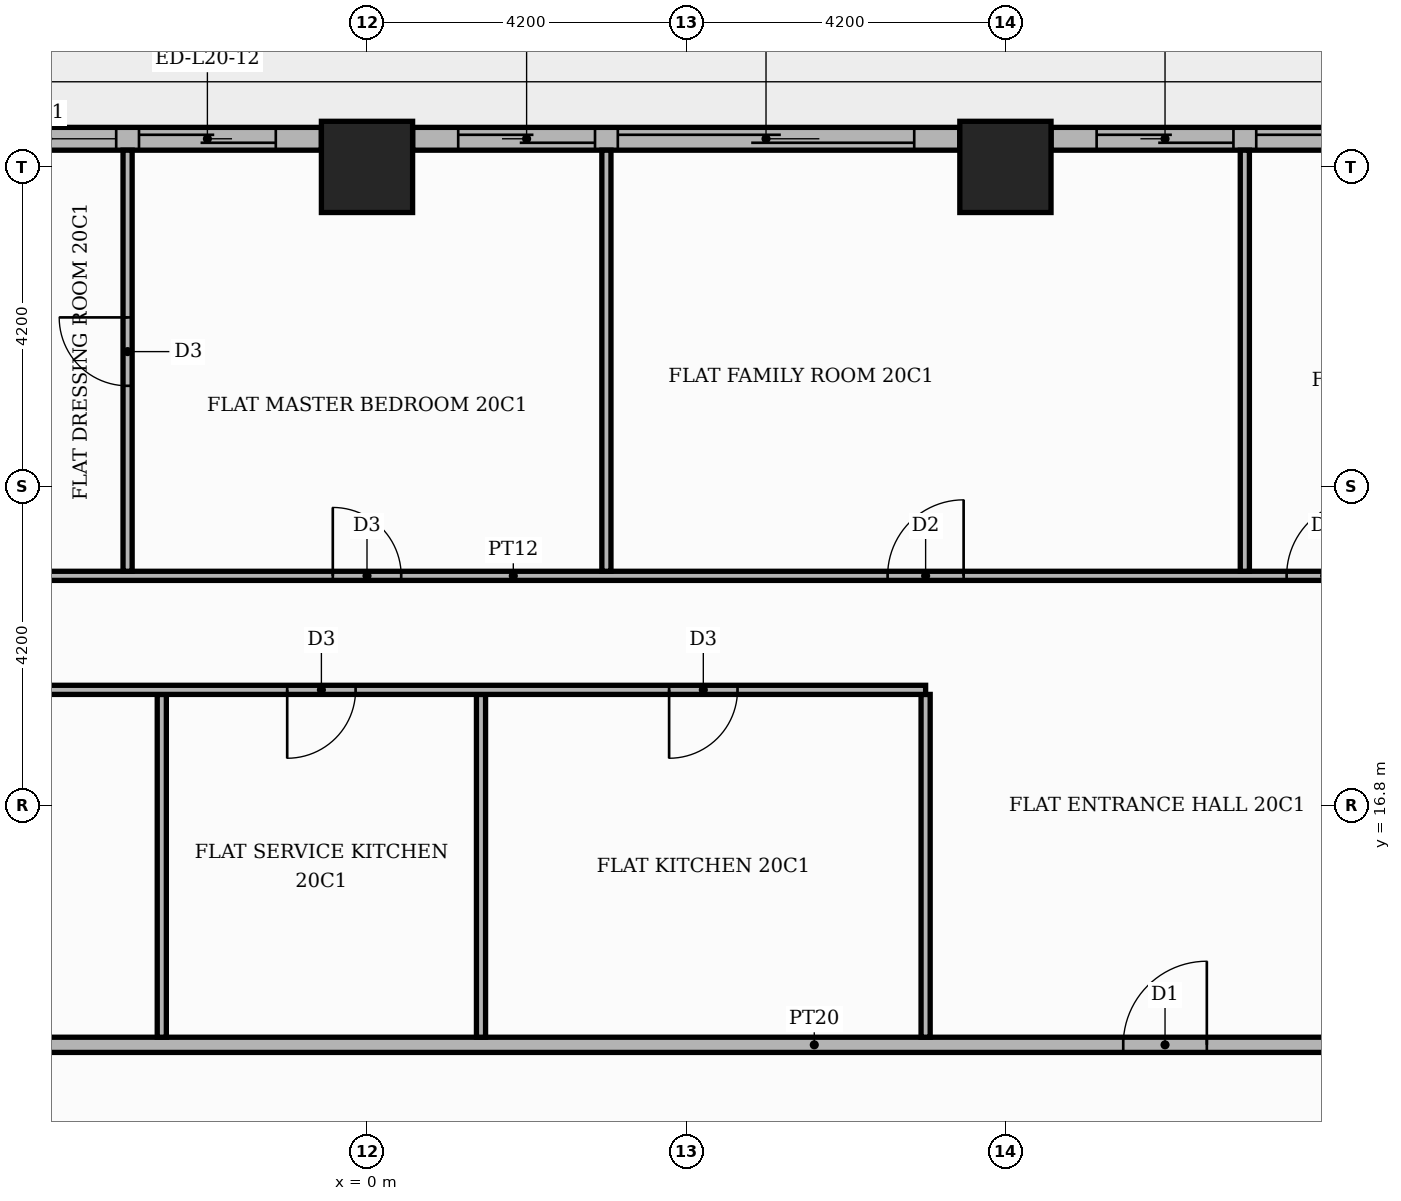
"""IFC4 building model, lengths in metres.
Left out: names, types, materials, properties, quantities, classifications, styles, units other than length and angle.
Written with IfcOpenShell. Run it as: python <this file> out.ifc"""

import sys

from ifc_helpers import new_model, si_unit, direction, frame, frame_2d, origin, origin_2d, place, context, subcontext, project, spatial, rectangle, extrude, element, fill, save


model = new_model("IFC4")
c1 = context("Model", 3, precision=1e-05, world=origin(), true_north=direction((0.0, 1.0)))
c2 = subcontext(c1, "Body", "Model", "MODEL_VIEW")
j1 = project(units=[si_unit("LENGTHUNIT", "METRE"), si_unit("PLANEANGLEUNIT", "RADIAN")], contexts=[c1])
p1 = place(None, origin())
s1 = spatial("IfcSite", under=j1, at=p1, CompositionType="ELEMENT")
p2 = place(p1, origin())
s2 = spatial("IfcBuilding", under=s1, at=p2, CompositionType="ELEMENT")
p3 = place(p2, frame((0.0, 0.0, 87.0)))
s3 = spatial("IfcBuildingStorey", under=s2, at=p3, CompositionType="ELEMENT", Elevation=87.0)
for number, where, z_axis, x_axis in (
    (1, (0.0, 25.2, 0.0), (0.0, 0.0, 1.0), (1.0, 0.0, 0.0)),
    (2, (8.4, 25.2, 0.0), (0.0, 0.0, 1.0), (1.0, 0.0, 0.0)),
):
    element("IfcColumn", number, at=place(p3, frame(where, z_axis=z_axis, x_axis=x_axis)), inside=s3, PredefinedType="COLUMN", context=c2, shape_type="SweptSolid", body=[
        extrude(rectangle(XDim=1.2, YDim=1.2, at=origin_2d()), origin(), (0.0, 0.0, 1.0), 3.9),
    ])
p4 = place(p3, frame((16.2, 25.57, 0.0), z_axis=(0.0, 0.0, 1.0), x_axis=(-1.0, 0.0, 0.0)))
e3 = element("IfcWall", 3, at=p4, inside=s3, PredefinedType="STANDARD", context=c2, shape_type="SweptSolid", body=[
    extrude(rectangle(XDim=7.2, YDim=0.3, at=frame_2d((3.6, 0.0))), origin(), (0.0, 0.0, 1.0), 3.48),
])
p5 = place(p4, frame((0.6, 0.0, 0.0)))
e4 = element("IfcOpeningElement", 4, at=p5, cuts=e3, PredefinedType="OPENING", context=c2, shape_type="SweptSolid", body=[
    extrude(rectangle(XDim=3.9, YDim=2.4, at=frame_2d((1.95, 1.2))), frame((0.0, 0.16, 0.0), z_axis=(0.0, -1.0, 0.0), x_axis=(1.0, 0.0, 0.0)), (0.0, 0.0, 1.0), 0.32),
])
p6 = place(p4, frame((4.8, 0.0, 0.0)))
e5 = element("IfcOpeningElement", 5, at=p6, cuts=e3, PredefinedType="OPENING", context=c2, shape_type="SweptSolid", body=[
    extrude(rectangle(XDim=1.8, YDim=2.4, at=frame_2d((0.9, 1.2))), frame((0.0, 0.16, 0.0), z_axis=(0.0, -1.0, 0.0), x_axis=(1.0, 0.0, 0.0)), (0.0, 0.0, 1.0), 0.32),
])
p7 = place(p3, frame((7.8, 25.57, 0.0), z_axis=(0.0, 0.0, 1.0), x_axis=(-1.0, 0.0, 0.0)))
e6 = element("IfcWall", 6, at=p7, inside=s3, PredefinedType="STANDARD", context=c2, shape_type="SweptSolid", body=[
    extrude(rectangle(XDim=7.2, YDim=0.3, at=frame_2d((3.6, 0.0))), origin(), (0.0, 0.0, 1.0), 3.48),
])
p8 = place(p7, frame((0.6, 0.0, 0.0)))
e7 = element("IfcOpeningElement", 7, at=p8, cuts=e6, PredefinedType="OPENING", context=c2, shape_type="SweptSolid", body=[
    extrude(rectangle(XDim=3.9, YDim=2.4, at=frame_2d((1.95, 1.2))), frame((0.0, 0.16, 0.0), z_axis=(0.0, -1.0, 0.0), x_axis=(1.0, 0.0, 0.0)), (0.0, 0.0, 1.0), 0.32),
])
p9 = place(p7, frame((4.8, 0.0, 0.0)))
e8 = element("IfcOpeningElement", 8, at=p9, cuts=e6, PredefinedType="OPENING", context=c2, shape_type="SweptSolid", body=[
    extrude(rectangle(XDim=1.8, YDim=2.4, at=frame_2d((0.9, 1.2))), frame((0.0, 0.16, 0.0), z_axis=(0.0, -1.0, 0.0), x_axis=(1.0, 0.0, 0.0)), (0.0, 0.0, 1.0), 0.32),
])
p10 = place(p3, frame((-0.6, 25.57, 0.0), z_axis=(0.0, 0.0, 1.0), x_axis=(-1.0, 0.0, 0.0)))
e9 = element("IfcWall", 9, at=p10, inside=s3, PredefinedType="STANDARD", context=c2, shape_type="SweptSolid", body=[
    extrude(rectangle(XDim=7.2, YDim=0.3, at=frame_2d((3.6, 0.0))), origin(), (0.0, 0.0, 1.0), 3.48),
])
p11 = place(p10, frame((0.6, 0.0, 0.0)))
e10 = element("IfcOpeningElement", 10, at=p11, cuts=e9, PredefinedType="OPENING", context=c2, shape_type="SweptSolid", body=[
    extrude(rectangle(XDim=1.8, YDim=2.4, at=frame_2d((0.9, 1.2))), frame((0.0, 0.16, 0.0), z_axis=(0.0, -1.0, 0.0), x_axis=(1.0, 0.0, 0.0)), (0.0, 0.0, 1.0), 0.32),
])
p12 = place(p10, frame((2.7, 0.0, 0.9)))
e11 = element("IfcOpeningElement", 11, at=p12, cuts=e9, PredefinedType="OPENING", context=c2, shape_type="SweptSolid", body=[
    extrude(rectangle(XDim=1.8, YDim=2.1, at=frame_2d((0.9, 1.05))), frame((0.0, 0.16, 0.0), z_axis=(0.0, -1.0, 0.0), x_axis=(1.0, 0.0, 0.0)), (0.0, 0.0, 1.0), 0.32),
])
p13 = place(p10, frame((4.8, 0.0, 0.9)))
e12 = element("IfcOpeningElement", 12, at=p13, cuts=e9, PredefinedType="OPENING", context=c2, shape_type="SweptSolid", body=[
    extrude(rectangle(XDim=1.8, YDim=2.1, at=frame_2d((0.9, 1.05))), frame((0.0, 0.16, 0.0), z_axis=(0.0, -1.0, 0.0), x_axis=(1.0, 0.0, 0.0)), (0.0, 0.0, 1.0), 0.32),
])
p14 = place(p3, frame((-13.65, 13.65, 0.0), z_axis=(0.0, 0.0, 1.0), x_axis=(1.0, 0.0, 0.0)))
e13 = element("IfcWall", 13, at=p14, inside=s3, PredefinedType="PARTITIONING", context=c2, shape_type="SweptSolid", body=[
    extrude(rectangle(XDim=39.07, YDim=0.2, at=frame_2d((19.535, 0.0))), origin(), (0.0, 0.0, 1.0), 3.48),
])
p15 = place(p14, frame((23.6, 0.0, 0.0)))
e14 = element("IfcOpeningElement", 14, at=p15, cuts=e13, PredefinedType="OPENING", context=c2, shape_type="SweptSolid", body=[
    extrude(rectangle(XDim=1.1, YDim=2.4, at=frame_2d((0.55, 1.2))), frame((0.0, 0.11, 0.0), z_axis=(0.0, -1.0, 0.0), x_axis=(1.0, 0.0, 0.0)), (0.0, 0.0, 1.0), 0.22),
])
for number, where, z_axis, x_axis in (
    (15, (-2.7, 13.75, 0.0), (0.0, 0.0, 1.0), (0.0, 1.0, 0.0)),
    (16, (1.5, 13.75, 0.0), (0.0, 0.0, 1.0), (0.0, 1.0, 0.0)),
    (17, (7.35, 13.75, 0.0), (0.0, 0.0, 1.0), (0.0, 1.0, 0.0)),
):
    element("IfcWall", number, at=place(p3, frame(where, z_axis=z_axis, x_axis=x_axis)), inside=s3, PredefinedType="PARTITIONING", context=c2, shape_type="SweptSolid", body=[
        extrude(rectangle(XDim=4.51, YDim=0.12, at=frame_2d((2.255, 0.0))), origin(), (0.0, 0.0, 1.0), 3.48),
    ])
p16 = place(p3, frame((-13.55, 18.32, 0.0), z_axis=(0.0, 0.0, 1.0), x_axis=(1.0, 0.0, 0.0)))
e18 = element("IfcWall", 18, at=p16, inside=s3, PredefinedType="PARTITIONING", context=c2, shape_type="SweptSolid", body=[
    extrude(rectangle(XDim=20.9, YDim=0.12, at=frame_2d((10.45, 0.0))), origin(), (0.0, 0.0, 1.0), 3.48),
])
p17 = place(p16, frame((17.525, 0.0, 0.0)))
e19 = element("IfcOpeningElement", 19, at=p17, cuts=e18, PredefinedType="OPENING", context=c2, shape_type="SweptSolid", body=[
    extrude(rectangle(XDim=0.9, YDim=2.1, at=frame_2d((0.45, 1.05))), frame((0.0, 0.07, 0.0), z_axis=(0.0, -1.0, 0.0), x_axis=(1.0, 0.0, 0.0)), (0.0, 0.0, 1.0), 0.14),
])
p18 = place(p16, frame((12.5, 0.0, 0.0)))
e20 = element("IfcOpeningElement", 20, at=p18, cuts=e18, PredefinedType="OPENING", context=c2, shape_type="SweptSolid", body=[
    extrude(rectangle(XDim=0.9, YDim=2.1, at=frame_2d((0.45, 1.05))), frame((0.0, 0.07, 0.0), z_axis=(0.0, -1.0, 0.0), x_axis=(1.0, 0.0, 0.0)), (0.0, 0.0, 1.0), 0.14),
])
p19 = place(p16, frame((7.025, 0.0, 0.0)))
e21 = element("IfcOpeningElement", 21, at=p19, cuts=e18, PredefinedType="OPENING", context=c2, shape_type="SweptSolid", body=[
    extrude(rectangle(XDim=0.9, YDim=2.1, at=frame_2d((0.45, 1.05))), frame((0.0, 0.07, 0.0), z_axis=(0.0, -1.0, 0.0), x_axis=(1.0, 0.0, 0.0)), (0.0, 0.0, 1.0), 0.14),
])
p20 = place(p16, frame((2.6, 0.0, 0.0)))
e22 = element("IfcOpeningElement", 22, at=p20, cuts=e18, PredefinedType="OPENING", context=c2, shape_type="SweptSolid", body=[
    extrude(rectangle(XDim=0.9, YDim=2.1, at=frame_2d((0.45, 1.05))), frame((0.0, 0.07, 0.0), z_axis=(0.0, -1.0, 0.0), x_axis=(1.0, 0.0, 0.0)), (0.0, 0.0, 1.0), 0.14),
])
p21 = place(p16, frame((0.5, 0.0, 0.0)))
e23 = element("IfcOpeningElement", 23, at=p21, cuts=e18, PredefinedType="OPENING", context=c2, shape_type="SweptSolid", body=[
    extrude(rectangle(XDim=0.9, YDim=2.1, at=frame_2d((0.45, 1.05))), frame((0.0, 0.07, 0.0), z_axis=(0.0, -1.0, 0.0), x_axis=(1.0, 0.0, 0.0)), (0.0, 0.0, 1.0), 0.14),
])
p22 = place(p3, frame((-13.55, 19.82, 0.0), z_axis=(0.0, 0.0, 1.0), x_axis=(1.0, 0.0, 0.0)))
e24 = element("IfcWall", 24, at=p22, inside=s3, PredefinedType="PARTITIONING", context=c2, shape_type="SweptSolid", body=[
    extrude(rectangle(XDim=30.95, YDim=0.12, at=frame_2d((15.475, 0.0))), origin(), (0.0, 0.0, 1.0), 3.48),
])
p23 = place(p22, frame((25.65, 0.0, 0.0)))
e25 = element("IfcOpeningElement", 25, at=p23, cuts=e24, PredefinedType="OPENING", context=c2, shape_type="SweptSolid", body=[
    extrude(rectangle(XDim=1.0, YDim=2.1, at=frame_2d((0.5, 1.05))), frame((0.0, 0.07, 0.0), z_axis=(0.0, -1.0, 0.0), x_axis=(1.0, 0.0, 0.0)), (0.0, 0.0, 1.0), 0.14),
])
p24 = place(p22, frame((20.4, 0.0, 0.0)))
e26 = element("IfcOpeningElement", 26, at=p24, cuts=e24, PredefinedType="OPENING", context=c2, shape_type="SweptSolid", body=[
    extrude(rectangle(XDim=1.0, YDim=2.1, at=frame_2d((0.5, 1.05))), frame((0.0, 0.07, 0.0), z_axis=(0.0, -1.0, 0.0), x_axis=(1.0, 0.0, 0.0)), (0.0, 0.0, 1.0), 0.14),
])
p25 = place(p22, frame((13.1, 0.0, 0.0)))
e27 = element("IfcOpeningElement", 27, at=p25, cuts=e24, PredefinedType="OPENING", context=c2, shape_type="SweptSolid", body=[
    extrude(rectangle(XDim=0.9, YDim=2.1, at=frame_2d((0.45, 1.05))), frame((0.0, 0.07, 0.0), z_axis=(0.0, -1.0, 0.0), x_axis=(1.0, 0.0, 0.0)), (0.0, 0.0, 1.0), 0.14),
])
p26 = place(p22, frame((3.65, 0.0, 0.0)))
e28 = element("IfcOpeningElement", 28, at=p26, cuts=e24, PredefinedType="OPENING", context=c2, shape_type="SweptSolid", body=[
    extrude(rectangle(XDim=0.9, YDim=2.1, at=frame_2d((0.45, 1.05))), frame((0.0, 0.07, 0.0), z_axis=(0.0, -1.0, 0.0), x_axis=(1.0, 0.0, 0.0)), (0.0, 0.0, 1.0), 0.14),
])
p27 = place(p3, frame((-3.15, 19.88, 0.0), z_axis=(0.0, 0.0, 1.0), x_axis=(0.0, 1.0, 0.0)))
e29 = element("IfcWall", 29, at=p27, inside=s3, PredefinedType="PARTITIONING", context=c2, shape_type="SweptSolid", body=[
    extrude(rectangle(XDim=5.54, YDim=0.12, at=frame_2d((2.77, 0.0))), origin(), (0.0, 0.0, 1.0), 3.48),
])
p28 = place(p27, frame((2.44, 0.0, 0.0)))
e30 = element("IfcOpeningElement", 30, at=p28, cuts=e29, PredefinedType="OPENING", context=c2, shape_type="SweptSolid", body=[
    extrude(rectangle(XDim=0.9, YDim=2.1, at=frame_2d((0.45, 1.05))), frame((0.0, 0.07, 0.0), z_axis=(0.0, -1.0, 0.0), x_axis=(1.0, 0.0, 0.0)), (0.0, 0.0, 1.0), 0.14),
])
for number, where, z_axis, x_axis in (
    (31, (3.15, 19.88, 0.0), (0.0, 0.0, 1.0), (0.0, 1.0, 0.0)),
    (32, (11.55, 19.88, 0.0), (0.0, 0.0, 1.0), (0.0, 1.0, 0.0)),
):
    element("IfcWall", number, at=place(p3, frame(where, z_axis=z_axis, x_axis=x_axis)), inside=s3, PredefinedType="PARTITIONING", context=c2, shape_type="SweptSolid", body=[
        extrude(rectangle(XDim=5.54, YDim=0.12, at=frame_2d((2.77, 0.0))), origin(), (0.0, 0.0, 1.0), 3.48),
    ])
p29 = place(p5, origin())
e33 = element("IfcDoor", 33, at=p29, inside=s3, OperationType="SLIDING_TO_LEFT", PredefinedType="DOOR", context=c2, shape_type="SweptSolid", body=[
    extrude(rectangle(XDim=3.9, YDim=2.4, at=frame_2d((1.95, 1.2))), frame((0.0, 0.025, 0.0), z_axis=(0.0, -1.0, 0.0), x_axis=(1.0, 0.0, 0.0)), (0.0, 0.0, 1.0), 0.05),
])
fill(e4, e33)
p30 = place(p6, origin())
e34 = element("IfcDoor", 34, at=p30, inside=s3, OperationType="SLIDING_TO_RIGHT", PredefinedType="DOOR", context=c2, shape_type="SweptSolid", body=[
    extrude(rectangle(XDim=1.8, YDim=2.4, at=frame_2d((0.9, 1.2))), frame((0.0, 0.025, 0.0), z_axis=(0.0, -1.0, 0.0), x_axis=(1.0, 0.0, 0.0)), (0.0, 0.0, 1.0), 0.05),
])
fill(e5, e34)
p31 = place(p8, origin())
e35 = element("IfcDoor", 35, at=p31, inside=s3, OperationType="SLIDING_TO_LEFT", PredefinedType="DOOR", context=c2, shape_type="SweptSolid", body=[
    extrude(rectangle(XDim=3.9, YDim=2.4, at=frame_2d((1.95, 1.2))), frame((0.0, 0.025, 0.0), z_axis=(0.0, -1.0, 0.0), x_axis=(1.0, 0.0, 0.0)), (0.0, 0.0, 1.0), 0.05),
])
fill(e7, e35)
p32 = place(p9, origin())
e36 = element("IfcDoor", 36, at=p32, inside=s3, OperationType="SLIDING_TO_RIGHT", PredefinedType="DOOR", context=c2, shape_type="SweptSolid", body=[
    extrude(rectangle(XDim=1.8, YDim=2.4, at=frame_2d((0.9, 1.2))), frame((0.0, 0.025, 0.0), z_axis=(0.0, -1.0, 0.0), x_axis=(1.0, 0.0, 0.0)), (0.0, 0.0, 1.0), 0.05),
])
fill(e8, e36)
p33 = place(p11, origin())
e37 = element("IfcDoor", 37, at=p33, inside=s3, OperationType="SLIDING_TO_LEFT", PredefinedType="DOOR", context=c2, shape_type="SweptSolid", body=[
    extrude(rectangle(XDim=1.8, YDim=2.4, at=frame_2d((0.9, 1.2))), frame((0.0, 0.025, 0.0), z_axis=(0.0, -1.0, 0.0), x_axis=(1.0, 0.0, 0.0)), (0.0, 0.0, 1.0), 0.05),
])
fill(e10, e37)
p34 = place(p12, origin())
e38 = element("IfcWindow", 38, at=p34, inside=s3, PartitioningType="SINGLE_PANEL", PredefinedType="WINDOW", context=c2, shape_type="SweptSolid", body=[
    extrude(rectangle(XDim=1.8, YDim=2.1, at=frame_2d((0.9, 1.05))), frame((0.0, 0.03, 0.0), z_axis=(0.0, -1.0, 0.0), x_axis=(1.0, 0.0, 0.0)), (0.0, 0.0, 1.0), 0.06),
])
fill(e11, e38)
p35 = place(p15, origin())
e39 = element("IfcDoor", 39, at=p35, inside=s3, OperationType="SINGLE_SWING_RIGHT", PredefinedType="DOOR", context=c2, shape_type="SweptSolid", body=[
    extrude(rectangle(XDim=1.1, YDim=2.4, at=frame_2d((0.55, 1.2))), frame((0.0, 0.025, 0.0), z_axis=(0.0, -1.0, 0.0), x_axis=(1.0, 0.0, 0.0)), (0.0, 0.0, 1.0), 0.05),
])
fill(e14, e39)
p36 = place(p17, frame((0.9, 0.0, 0.0), z_axis=(0.0, 0.0, 1.0), x_axis=(-1.0, 0.0, 0.0)))
e40 = element("IfcDoor", 40, at=p36, inside=s3, OperationType="SINGLE_SWING_LEFT", PredefinedType="DOOR", context=c2, shape_type="SweptSolid", body=[
    extrude(rectangle(XDim=0.9, YDim=2.1, at=frame_2d((0.45, 1.05))), frame((0.0, 0.025, 0.0), z_axis=(0.0, -1.0, 0.0), x_axis=(1.0, 0.0, 0.0)), (0.0, 0.0, 1.0), 0.05),
])
fill(e19, e40)
p37 = place(p18, frame((0.9, 0.0, 0.0), z_axis=(0.0, 0.0, 1.0), x_axis=(-1.0, 0.0, 0.0)))
e41 = element("IfcDoor", 41, at=p37, inside=s3, OperationType="SINGLE_SWING_LEFT", PredefinedType="DOOR", context=c2, shape_type="SweptSolid", body=[
    extrude(rectangle(XDim=0.9, YDim=2.1, at=frame_2d((0.45, 1.05))), frame((0.0, 0.025, 0.0), z_axis=(0.0, -1.0, 0.0), x_axis=(1.0, 0.0, 0.0)), (0.0, 0.0, 1.0), 0.05),
])
fill(e20, e41)
p38 = place(p23, origin())
e42 = element("IfcDoor", 42, at=p38, inside=s3, OperationType="SINGLE_SWING_RIGHT", PredefinedType="DOOR", context=c2, shape_type="SweptSolid", body=[
    extrude(rectangle(XDim=1.0, YDim=2.1, at=frame_2d((0.5, 1.05))), frame((0.0, 0.025, 0.0), z_axis=(0.0, -1.0, 0.0), x_axis=(1.0, 0.0, 0.0)), (0.0, 0.0, 1.0), 0.05),
])
fill(e25, e42)
p39 = place(p24, origin())
e43 = element("IfcDoor", 43, at=p39, inside=s3, OperationType="SINGLE_SWING_RIGHT", PredefinedType="DOOR", context=c2, shape_type="SweptSolid", body=[
    extrude(rectangle(XDim=1.0, YDim=2.1, at=frame_2d((0.5, 1.05))), frame((0.0, 0.025, 0.0), z_axis=(0.0, -1.0, 0.0), x_axis=(1.0, 0.0, 0.0)), (0.0, 0.0, 1.0), 0.05),
])
fill(e26, e43)
p40 = place(p25, origin())
e44 = element("IfcDoor", 44, at=p40, inside=s3, OperationType="SINGLE_SWING_LEFT", PredefinedType="DOOR", context=c2, shape_type="SweptSolid", body=[
    extrude(rectangle(XDim=0.9, YDim=2.1, at=frame_2d((0.45, 1.05))), frame((0.0, 0.025, 0.0), z_axis=(0.0, -1.0, 0.0), x_axis=(1.0, 0.0, 0.0)), (0.0, 0.0, 1.0), 0.05),
])
fill(e27, e44)
p41 = place(p28, origin())
e45 = element("IfcDoor", 45, at=p41, inside=s3, OperationType="SINGLE_SWING_RIGHT", PredefinedType="DOOR", context=c2, shape_type="SweptSolid", body=[
    extrude(rectangle(XDim=0.9, YDim=2.1, at=frame_2d((0.45, 1.05))), frame((0.0, 0.025, 0.0), z_axis=(0.0, -1.0, 0.0), x_axis=(1.0, 0.0, 0.0)), (0.0, 0.0, 1.0), 0.05),
])
fill(e30, e45)
save(model, sys.argv[1])
